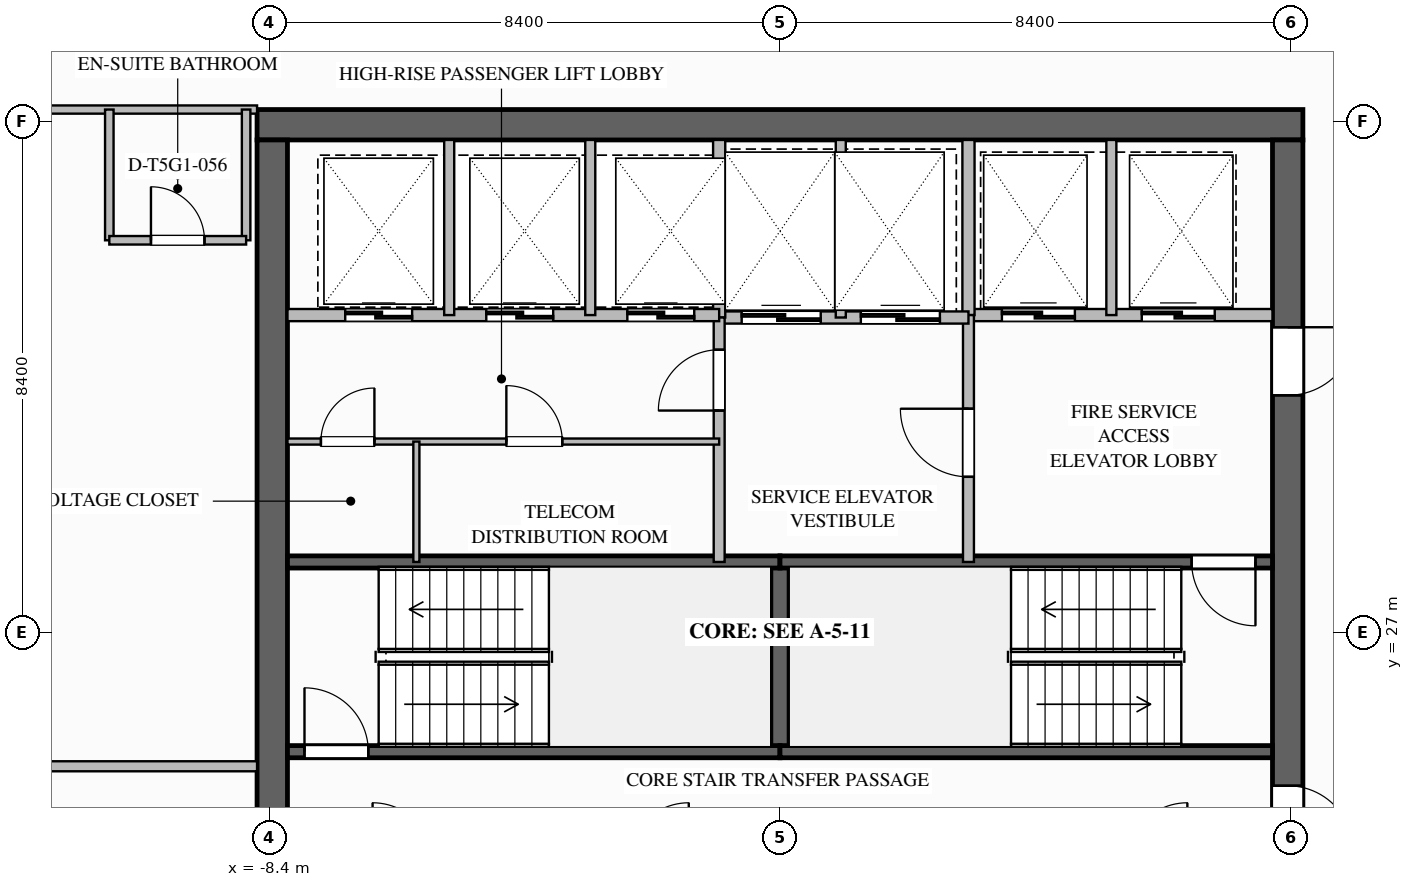
"""IFC4 building model, lengths in metres.
Left out: names, types, materials, properties, quantities, classifications, styles, units other than length and angle.
Written with IfcOpenShell. Run it as: python <this file> out.ifc"""

import sys

from ifc_helpers import new_model, si_unit, direction, frame, frame_2d, origin, place, context, subcontext, project, spatial, rectangle, extrude, element, fill, save


model = new_model("IFC4")
c1 = context("Model", 3, precision=1e-05, world=origin(), true_north=direction((0.0, 1.0)))
c2 = subcontext(c1, "Body", "Model", "MODEL_VIEW")
j1 = project(units=[si_unit("LENGTHUNIT", "METRE"), si_unit("PLANEANGLEUNIT", "RADIAN")], contexts=[c1])
p1 = place(None, origin())
s1 = spatial("IfcSite", under=j1, at=p1, CompositionType="ELEMENT")
p2 = place(p1, origin())
s2 = spatial("IfcBuilding", under=s1, at=p2, CompositionType="ELEMENT")
p3 = place(p2, frame((0.0, 0.0, 272.3)))
s3 = spatial("IfcBuildingStorey", under=s2, at=p3, CompositionType="ELEMENT", Elevation=272.3)
p4 = place(p3, frame((-8.6, 35.35, 0.0), z_axis=(0.0, 0.0, 1.0), x_axis=(1.0, 0.0, 0.0)))
e1 = element("IfcWall", 1, at=p4, inside=s3, PredefinedType="SHEAR", context=c2, shape_type="SweptSolid", body=[
    extrude(rectangle(XDim=17.2, YDim=0.5, at=frame_2d((8.6, 0.0))), origin(), (0.0, 0.0, 1.0), 3.65),
])
p5 = place(p3, frame((8.35, 35.1, 0.0), z_axis=(0.0, 0.0, 1.0), x_axis=(0.0, -1.0, 0.0)))
e2 = element("IfcWall", 2, at=p5, inside=s3, PredefinedType="SHEAR", context=c2, shape_type="SweptSolid", body=[
    extrude(rectangle(XDim=16.2, YDim=0.5, at=frame_2d((8.1, 0.0))), origin(), (0.0, 0.0, 1.0), 3.65),
])
p6 = place(p5, frame((3.08, 0.0, 0.0)))
e3 = element("IfcOpeningElement", 3, at=p6, cuts=e2, PredefinedType="OPENING", context=c2, shape_type="SweptSolid", body=[
    extrude(rectangle(XDim=1.12, YDim=2.1, at=frame_2d((0.56, 1.05))), frame((0.0, 0.26, 0.0), z_axis=(0.0, -1.0, 0.0), x_axis=(1.0, 0.0, 0.0)), (0.0, 0.0, 1.0), 0.52),
])
p7 = place(p5, frame((10.62, 0.0, 0.0)))
e4 = element("IfcOpeningElement", 4, at=p7, cuts=e2, PredefinedType="OPENING", context=c2, shape_type="SweptSolid", body=[
    extrude(rectangle(XDim=1.08, YDim=2.04, at=frame_2d((0.54, 1.02))), frame((0.0, 0.26, 0.0), z_axis=(0.0, -1.0, 0.0), x_axis=(1.0, 0.0, 0.0)), (0.0, 0.0, 1.0), 0.52),
])
p8 = place(p3, frame((-8.35, 18.9, 0.0), z_axis=(0.0, 0.0, 1.0), x_axis=(0.0, 1.0, 0.0)))
e5 = element("IfcWall", 5, at=p8, inside=s3, PredefinedType="SHEAR", context=c2, shape_type="SweptSolid", body=[
    extrude(rectangle(XDim=16.2, YDim=0.5, at=frame_2d((8.1, 0.0))), origin(), (0.0, 0.0, 1.0), 3.65),
])
p9 = place(p3, frame((0.0, 25.04, 0.0), z_axis=(0.0, 0.0, 1.0), x_axis=(0.0, 1.0, 0.0)))
e6 = element("IfcWall", 6, at=p9, inside=s3, PredefinedType="SOLIDWALL", context=c2, shape_type="SweptSolid", body=[
    extrude(rectangle(XDim=3.12, YDim=0.3, at=frame_2d((1.56, 0.0))), origin(), (0.0, 0.0, 1.0), 3.39),
])
p10 = place(p3, frame((-8.1, 25.04, 0.0), z_axis=(0.0, 0.0, 1.0), x_axis=(1.0, 0.0, 0.0)))
e7 = element("IfcWall", 7, at=p10, inside=s3, PredefinedType="SOLIDWALL", context=c2, shape_type="SweptSolid", body=[
    extrude(rectangle(XDim=8.1, YDim=0.2, at=frame_2d((4.05, 0.0))), origin(), (0.0, 0.0, 1.0), 3.39),
])
p11 = place(p10, frame((0.28, 0.0, 0.0)))
e8 = element("IfcOpeningElement", 8, at=p11, cuts=e7, PredefinedType="OPENING", context=c2, shape_type="SweptSolid", body=[
    extrude(rectangle(XDim=1.05, YDim=2.1, at=frame_2d((0.525, 1.05))), frame((0.0, 0.11, 0.0), z_axis=(0.0, -1.0, 0.0), x_axis=(1.0, 0.0, 0.0)), (0.0, 0.0, 1.0), 0.22),
])
for number, where, z_axis, x_axis in (
    (9, (-8.1, 28.16, 0.0), (0.0, 0.0, 1.0), (1.0, 0.0, 0.0)),
    (10, (0.0, 25.04, 0.0), (0.0, 0.0, 1.0), (1.0, 0.0, 0.0)),
):
    element("IfcWall", number, at=place(p3, frame(where, z_axis=z_axis, x_axis=x_axis)), inside=s3, PredefinedType="SOLIDWALL", context=c2, shape_type="SweptSolid", body=[
        extrude(rectangle(XDim=8.1, YDim=0.2, at=frame_2d((4.05, 0.0))), origin(), (0.0, 0.0, 1.0), 3.39),
    ])
p12 = place(p3, frame((8.1, 28.16, 0.0), z_axis=(0.0, 0.0, 1.0), x_axis=(-1.0, 0.0, 0.0)))
e11 = element("IfcWall", 11, at=p12, inside=s3, PredefinedType="SOLIDWALL", context=c2, shape_type="SweptSolid", body=[
    extrude(rectangle(XDim=8.1, YDim=0.2, at=frame_2d((4.05, 0.0))), origin(), (0.0, 0.0, 1.0), 3.39),
])
p13 = place(p12, frame((0.28, 0.0, 0.0)))
e12 = element("IfcOpeningElement", 12, at=p13, cuts=e11, PredefinedType="OPENING", context=c2, shape_type="SweptSolid", body=[
    extrude(rectangle(XDim=1.05, YDim=2.1, at=frame_2d((0.525, 1.05))), frame((0.0, 0.11, 0.0), z_axis=(0.0, -1.0, 0.0), x_axis=(1.0, 0.0, 0.0)), (0.0, 0.0, 1.0), 0.22),
])
p14 = place(p3, frame((3.1, 32.22, 0.0), z_axis=(0.0, 0.0, 1.0), x_axis=(1.0, 0.0, 0.0)))
e13 = element("IfcWall", 13, at=p14, inside=s3, PredefinedType="SOLIDWALL", context=c2, shape_type="SweptSolid", body=[
    extrude(rectangle(XDim=5.0, YDim=0.2, at=frame_2d((2.5, 0.0))), origin(), (0.0, 0.0, 1.0), 3.39),
])
p15 = place(p14, frame((0.55, 0.0, 0.0)))
e14 = element("IfcOpeningElement", 14, at=p15, cuts=e13, PredefinedType="OPENING", context=c2, shape_type="SweptSolid", body=[
    extrude(rectangle(XDim=1.2, YDim=2.2, at=frame_2d((0.6, 1.1))), frame((0.0, 0.11, 0.0), z_axis=(0.0, -1.0, 0.0), x_axis=(1.0, 0.0, 0.0)), (0.0, 0.0, 1.0), 0.22),
])
p16 = place(p14, frame((2.85, 0.0, 0.0)))
e15 = element("IfcOpeningElement", 15, at=p16, cuts=e13, PredefinedType="OPENING", context=c2, shape_type="SweptSolid", body=[
    extrude(rectangle(XDim=1.2, YDim=2.2, at=frame_2d((0.6, 1.1))), frame((0.0, 0.11, 0.0), z_axis=(0.0, -1.0, 0.0), x_axis=(1.0, 0.0, 0.0)), (0.0, 0.0, 1.0), 0.22),
])
p17 = place(p3, frame((3.1, 32.22, 0.0), z_axis=(0.0, 0.0, 1.0), x_axis=(0.0, 1.0, 0.0)))
e16 = element("IfcWall", 16, at=p17, inside=s3, PredefinedType="SOLIDWALL", context=c2, shape_type="SweptSolid", body=[
    extrude(rectangle(XDim=2.88, YDim=0.2, at=frame_2d((1.44, 0.0))), origin(), (0.0, 0.0, 1.0), 3.39),
])
p18 = place(p3, frame((5.45, 32.22, 0.0), z_axis=(0.0, 0.0, 1.0), x_axis=(0.0, 1.0, 0.0)))
e17 = element("IfcWall", 17, at=p18, inside=s3, PredefinedType="PARTITIONING", context=c2, shape_type="SweptSolid", body=[
    extrude(rectangle(XDim=2.88, YDim=0.165, at=frame_2d((1.44, 0.0))), origin(), (0.0, 0.0, 1.0), 3.39),
])
p19 = place(p3, frame((3.1, 28.16, 0.0), z_axis=(0.0, 0.0, 1.0), x_axis=(0.0, 1.0, 0.0)))
e18 = element("IfcWall", 18, at=p19, inside=s3, PredefinedType="SOLIDWALL", context=c2, shape_type="SweptSolid", body=[
    extrude(rectangle(XDim=4.06, YDim=0.18, at=frame_2d((2.03, 0.0))), origin(), (0.0, 0.0, 1.0), 3.39),
])
p20 = place(p19, frame((1.4, 0.0, 0.0)))
e19 = element("IfcOpeningElement", 19, at=p20, cuts=e18, PredefinedType="OPENING", context=c2, shape_type="SweptSolid", body=[
    extrude(rectangle(XDim=1.12, YDim=2.1, at=frame_2d((0.56, 1.05))), frame((0.0, 0.1, 0.0), z_axis=(0.0, -1.0, 0.0), x_axis=(1.0, 0.0, 0.0)), (0.0, 0.0, 1.0), 0.2),
])
p21 = place(p3, frame((-1.0, 32.18, 0.0), z_axis=(0.0, 0.0, 1.0), x_axis=(1.0, 0.0, 0.0)))
e20 = element("IfcWall", 20, at=p21, inside=s3, PredefinedType="SOLIDWALL", context=c2, shape_type="SweptSolid", body=[
    extrude(rectangle(XDim=4.1, YDim=0.2, at=frame_2d((2.05, 0.0))), origin(), (0.0, 0.0, 1.0), 3.39),
])
p22 = place(p21, frame((0.37, 0.0, 0.0)))
e21 = element("IfcOpeningElement", 21, at=p22, cuts=e20, PredefinedType="OPENING", context=c2, shape_type="SweptSolid", body=[
    extrude(rectangle(XDim=1.3, YDim=2.2, at=frame_2d((0.65, 1.1))), frame((0.0, 0.11, 0.0), z_axis=(0.0, -1.0, 0.0), x_axis=(1.0, 0.0, 0.0)), (0.0, 0.0, 1.0), 0.22),
])
p23 = place(p21, frame((2.33, 0.0, 0.0)))
e22 = element("IfcOpeningElement", 22, at=p23, cuts=e20, PredefinedType="OPENING", context=c2, shape_type="SweptSolid", body=[
    extrude(rectangle(XDim=1.3, YDim=2.2, at=frame_2d((0.65, 1.1))), frame((0.0, 0.11, 0.0), z_axis=(0.0, -1.0, 0.0), x_axis=(1.0, 0.0, 0.0)), (0.0, 0.0, 1.0), 0.22),
])
p24 = place(p3, frame((-1.0, 32.18, 0.0), z_axis=(0.0, 0.0, 1.0), x_axis=(0.0, 1.0, 0.0)))
e23 = element("IfcWall", 23, at=p24, inside=s3, PredefinedType="SOLIDWALL", context=c2, shape_type="SweptSolid", body=[
    extrude(rectangle(XDim=2.92, YDim=0.2, at=frame_2d((1.46, 0.0))), origin(), (0.0, 0.0, 1.0), 3.39),
])
p25 = place(p3, frame((1.0, 32.18, 0.0), z_axis=(0.0, 0.0, 1.0), x_axis=(0.0, 1.0, 0.0)))
e24 = element("IfcWall", 24, at=p25, inside=s3, PredefinedType="PARTITIONING", context=c2, shape_type="SweptSolid", body=[
    extrude(rectangle(XDim=2.92, YDim=0.165, at=frame_2d((1.46, 0.0))), origin(), (0.0, 0.0, 1.0), 3.39),
])
p26 = place(p3, frame((-1.0, 28.16, 0.0), z_axis=(0.0, 0.0, 1.0), x_axis=(0.0, 1.0, 0.0)))
e25 = element("IfcWall", 25, at=p26, inside=s3, PredefinedType="SOLIDWALL", context=c2, shape_type="SweptSolid", body=[
    extrude(rectangle(XDim=4.02, YDim=0.18, at=frame_2d((2.01, 0.0))), origin(), (0.0, 0.0, 1.0), 3.39),
])
p27 = place(p26, frame((2.49, 0.0, 0.0)))
e26 = element("IfcOpeningElement", 26, at=p27, cuts=e25, PredefinedType="OPENING", context=c2, shape_type="SweptSolid", body=[
    extrude(rectangle(XDim=1.0, YDim=2.1, at=frame_2d((0.5, 1.05))), frame((0.0, 0.1, 0.0), z_axis=(0.0, -1.0, 0.0), x_axis=(1.0, 0.0, 0.0)), (0.0, 0.0, 1.0), 0.2),
])
p28 = place(p3, frame((-8.1, 32.22, 0.0), z_axis=(0.0, 0.0, 1.0), x_axis=(1.0, 0.0, 0.0)))
e27 = element("IfcWall", 27, at=p28, inside=s3, PredefinedType="SOLIDWALL", context=c2, shape_type="SweptSolid", body=[
    extrude(rectangle(XDim=7.1, YDim=0.2, at=frame_2d((3.55, 0.0))), origin(), (0.0, 0.0, 1.0), 3.39),
])
p29 = place(p28, frame((0.95, 0.0, 0.0)))
e28 = element("IfcOpeningElement", 28, at=p29, cuts=e27, PredefinedType="OPENING", context=c2, shape_type="SweptSolid", body=[
    extrude(rectangle(XDim=1.1, YDim=2.2, at=frame_2d((0.55, 1.1))), frame((0.0, 0.11, 0.0), z_axis=(0.0, -1.0, 0.0), x_axis=(1.0, 0.0, 0.0)), (0.0, 0.0, 1.0), 0.22),
])
p30 = place(p28, frame((3.27, 0.0, 0.0)))
e29 = element("IfcOpeningElement", 29, at=p30, cuts=e27, PredefinedType="OPENING", context=c2, shape_type="SweptSolid", body=[
    extrude(rectangle(XDim=1.1, YDim=2.2, at=frame_2d((0.55, 1.1))), frame((0.0, 0.11, 0.0), z_axis=(0.0, -1.0, 0.0), x_axis=(1.0, 0.0, 0.0)), (0.0, 0.0, 1.0), 0.22),
])
p31 = place(p28, frame((5.59, 0.0, 0.0)))
e30 = element("IfcOpeningElement", 30, at=p31, cuts=e27, PredefinedType="OPENING", context=c2, shape_type="SweptSolid", body=[
    extrude(rectangle(XDim=1.1, YDim=2.2, at=frame_2d((0.55, 1.1))), frame((0.0, 0.11, 0.0), z_axis=(0.0, -1.0, 0.0), x_axis=(1.0, 0.0, 0.0)), (0.0, 0.0, 1.0), 0.22),
])
for number, where, z_axis, x_axis in (
    (31, (-5.44, 32.22, 0.0), (0.0, 0.0, 1.0), (0.0, 1.0, 0.0)),
    (32, (-3.12, 32.22, 0.0), (0.0, 0.0, 1.0), (0.0, 1.0, 0.0)),
):
    element("IfcWall", number, at=place(p3, frame(where, z_axis=z_axis, x_axis=x_axis)), inside=s3, PredefinedType="PARTITIONING", context=c2, shape_type="SweptSolid", body=[
        extrude(rectangle(XDim=2.88, YDim=0.165, at=frame_2d((1.44, 0.0))), origin(), (0.0, 0.0, 1.0), 3.39),
    ])
p32 = place(p3, frame((-8.1, 30.14, 0.0), z_axis=(0.0, 0.0, 1.0), x_axis=(1.0, 0.0, 0.0)))
e33 = element("IfcWall", 33, at=p32, inside=s3, PredefinedType="PARTITIONING", context=c2, shape_type="SweptSolid", body=[
    extrude(rectangle(XDim=7.1, YDim=0.1, at=frame_2d((3.55, 0.0))), origin(), (0.0, 0.0, 1.0), 3.39),
])
p33 = place(p32, frame((0.55, 0.0, 0.0)))
e34 = element("IfcOpeningElement", 34, at=p33, cuts=e33, PredefinedType="OPENING", context=c2, shape_type="SweptSolid", body=[
    extrude(rectangle(XDim=0.88, YDim=2.1, at=frame_2d((0.44, 1.05))), frame((0.0, 0.06, 0.0), z_axis=(0.0, -1.0, 0.0), x_axis=(1.0, 0.0, 0.0)), (0.0, 0.0, 1.0), 0.12),
])
p34 = place(p32, frame((3.6, 0.0, 0.0)))
e35 = element("IfcOpeningElement", 35, at=p34, cuts=e33, PredefinedType="OPENING", context=c2, shape_type="SweptSolid", body=[
    extrude(rectangle(XDim=0.92, YDim=2.1, at=frame_2d((0.46, 1.05))), frame((0.0, 0.06, 0.0), z_axis=(0.0, -1.0, 0.0), x_axis=(1.0, 0.0, 0.0)), (0.0, 0.0, 1.0), 0.12),
])
p35 = place(p3, frame((-5.98, 28.16, 0.0), z_axis=(0.0, 0.0, 1.0), x_axis=(0.0, 1.0, 0.0)))
e36 = element("IfcWall", 36, at=p35, inside=s3, PredefinedType="PARTITIONING", context=c2, shape_type="SweptSolid", body=[
    extrude(rectangle(XDim=1.98, YDim=0.1, at=frame_2d((0.99, 0.0))), origin(), (0.0, 0.0, 1.0), 3.39),
])
p36 = place(p3, frame((-16.2, 35.6, 0.0), z_axis=(0.0, 0.0, 1.0), x_axis=(1.0, 0.0, 0.0)))
e37 = element("IfcWall", 37, at=p36, inside=s3, PredefinedType="PARTITIONING", context=c2, shape_type="SweptSolid", body=[
    extrude(rectangle(XDim=7.6, YDim=0.135, at=frame_2d((3.8, 0.0))), origin(), (0.0, 0.0, 1.0), 2.767),
])
p37 = place(p36, frame((2.155, 0.0, 0.0)))
e38 = element("IfcOpeningElement", 38, at=p37, cuts=e37, PredefinedType="OPENING", context=c2, shape_type="SweptSolid", body=[
    extrude(rectangle(XDim=1.26, YDim=2.2, at=frame_2d((0.63, 1.1))), frame((0.0, 0.077, 0.0), z_axis=(0.0, -1.0, 0.0), x_axis=(1.0, 0.0, 0.0)), (0.0, 0.0, 1.0), 0.155),
])
p38 = place(p3, frame((-21.4, 24.8, 0.0), z_axis=(0.0, 0.0, 1.0), x_axis=(1.0, 0.0, 0.0)))
e39 = element("IfcWall", 39, at=p38, inside=s3, PredefinedType="PARTITIONING", context=c2, shape_type="SweptSolid", body=[
    extrude(rectangle(XDim=12.8, YDim=0.165, at=frame_2d((6.4, 0.0))), origin(), (0.0, 0.0, 1.0), 3.39),
])
for number, where, z_axis, x_axis in (
    (40, (-11.03, 35.6, 0.0), (0.0, 0.0, 1.0), (0.0, -1.0, 0.0)),
    (41, (-8.78, 35.6, 0.0), (0.0, 0.0, 1.0), (0.0, -1.0, 0.0)),
):
    element("IfcWall", number, at=place(p3, frame(where, z_axis=z_axis, x_axis=x_axis)), inside=s3, PredefinedType="PLUMBINGWALL", context=c2, shape_type="SweptSolid", body=[
        extrude(rectangle(XDim=2.15, YDim=0.14, at=frame_2d((1.075, 0.0))), origin(), (0.0, 0.0, 1.0), 3.39),
    ])
p39 = place(p3, frame((-11.03, 33.45, 0.0), z_axis=(0.0, 0.0, 1.0), x_axis=(1.0, 0.0, 0.0)))
e42 = element("IfcWall", 42, at=p39, inside=s3, PredefinedType="PLUMBINGWALL", context=c2, shape_type="SweptSolid", body=[
    extrude(rectangle(XDim=2.25, YDim=0.14, at=frame_2d((1.125, 0.0))), origin(), (0.0, 0.0, 1.0), 3.39),
])
p40 = place(p39, frame((0.685, 0.0, 0.0)))
e43 = element("IfcOpeningElement", 43, at=p40, cuts=e42, PredefinedType="OPENING", context=c2, shape_type="SweptSolid", body=[
    extrude(rectangle(XDim=0.88, YDim=2.1, at=frame_2d((0.44, 1.05))), frame((0.0, 0.08, 0.0), z_axis=(0.0, -1.0, 0.0), x_axis=(1.0, 0.0, 0.0)), (0.0, 0.0, 1.0), 0.16),
])
p41 = place(p11, origin())
e44 = element("IfcDoor", 44, at=p41, inside=s3, OperationType="SINGLE_SWING_LEFT", PredefinedType="DOOR", context=c2, shape_type="SweptSolid", body=[
    extrude(rectangle(XDim=1.05, YDim=2.1, at=frame_2d((0.525, 1.05))), frame((0.0, 0.025, 0.0), z_axis=(0.0, -1.0, 0.0), x_axis=(1.0, 0.0, 0.0)), (0.0, 0.0, 1.0), 0.05),
])
fill(e8, e44)
p42 = place(p13, origin())
e45 = element("IfcDoor", 45, at=p42, inside=s3, OperationType="SINGLE_SWING_LEFT", PredefinedType="DOOR", context=c2, shape_type="SweptSolid", body=[
    extrude(rectangle(XDim=1.05, YDim=2.1, at=frame_2d((0.525, 1.05))), frame((0.0, 0.025, 0.0), z_axis=(0.0, -1.0, 0.0), x_axis=(1.0, 0.0, 0.0)), (0.0, 0.0, 1.0), 0.05),
])
fill(e12, e45)
p43 = place(p15, origin())
e46 = element("IfcDoor", 46, at=p43, inside=s3, OperationType="SLIDING_TO_LEFT", PredefinedType="DOOR", context=c2, shape_type="SweptSolid", body=[
    extrude(rectangle(XDim=1.2, YDim=2.2, at=frame_2d((0.6, 1.1))), frame((0.0, 0.025, 0.0), z_axis=(0.0, -1.0, 0.0), x_axis=(1.0, 0.0, 0.0)), (0.0, 0.0, 1.0), 0.05),
])
fill(e14, e46)
p44 = place(p16, origin())
e47 = element("IfcDoor", 47, at=p44, inside=s3, OperationType="SLIDING_TO_LEFT", PredefinedType="DOOR", context=c2, shape_type="SweptSolid", body=[
    extrude(rectangle(XDim=1.2, YDim=2.2, at=frame_2d((0.6, 1.1))), frame((0.0, 0.025, 0.0), z_axis=(0.0, -1.0, 0.0), x_axis=(1.0, 0.0, 0.0)), (0.0, 0.0, 1.0), 0.05),
])
fill(e15, e47)
p45 = place(p20, origin())
e48 = element("IfcDoor", 48, at=p45, inside=s3, OperationType="SINGLE_SWING_RIGHT", PredefinedType="DOOR", context=c2, shape_type="SweptSolid", body=[
    extrude(rectangle(XDim=1.12, YDim=2.1, at=frame_2d((0.56, 1.05))), frame((0.0, 0.025, 0.0), z_axis=(0.0, -1.0, 0.0), x_axis=(1.0, 0.0, 0.0)), (0.0, 0.0, 1.0), 0.05),
])
fill(e19, e48)
p46 = place(p6, origin())
e49 = element("IfcDoor", 49, at=p46, inside=s3, OperationType="SINGLE_SWING_LEFT", PredefinedType="DOOR", context=c2, shape_type="SweptSolid", body=[
    extrude(rectangle(XDim=1.12, YDim=2.1, at=frame_2d((0.56, 1.05))), frame((0.0, 0.025, 0.0), z_axis=(0.0, -1.0, 0.0), x_axis=(1.0, 0.0, 0.0)), (0.0, 0.0, 1.0), 0.05),
])
fill(e3, e49)
p47 = place(p22, origin())
e50 = element("IfcDoor", 50, at=p47, inside=s3, OperationType="SLIDING_TO_LEFT", PredefinedType="DOOR", context=c2, shape_type="SweptSolid", body=[
    extrude(rectangle(XDim=1.3, YDim=2.2, at=frame_2d((0.65, 1.1))), frame((0.0, 0.025, 0.0), z_axis=(0.0, -1.0, 0.0), x_axis=(1.0, 0.0, 0.0)), (0.0, 0.0, 1.0), 0.05),
])
fill(e21, e50)
p48 = place(p23, origin())
e51 = element("IfcDoor", 51, at=p48, inside=s3, OperationType="SLIDING_TO_LEFT", PredefinedType="DOOR", context=c2, shape_type="SweptSolid", body=[
    extrude(rectangle(XDim=1.3, YDim=2.2, at=frame_2d((0.65, 1.1))), frame((0.0, 0.025, 0.0), z_axis=(0.0, -1.0, 0.0), x_axis=(1.0, 0.0, 0.0)), (0.0, 0.0, 1.0), 0.05),
])
fill(e22, e51)
p49 = place(p27, origin())
e52 = element("IfcDoor", 52, at=p49, inside=s3, OperationType="SINGLE_SWING_LEFT", PredefinedType="DOOR", context=c2, shape_type="SweptSolid", body=[
    extrude(rectangle(XDim=1.0, YDim=2.1, at=frame_2d((0.5, 1.05))), frame((0.0, 0.025, 0.0), z_axis=(0.0, -1.0, 0.0), x_axis=(1.0, 0.0, 0.0)), (0.0, 0.0, 1.0), 0.05),
])
fill(e26, e52)
p50 = place(p29, origin())
e53 = element("IfcDoor", 53, at=p50, inside=s3, OperationType="SLIDING_TO_LEFT", PredefinedType="DOOR", context=c2, shape_type="SweptSolid", body=[
    extrude(rectangle(XDim=1.1, YDim=2.2, at=frame_2d((0.55, 1.1))), frame((0.0, 0.025, 0.0), z_axis=(0.0, -1.0, 0.0), x_axis=(1.0, 0.0, 0.0)), (0.0, 0.0, 1.0), 0.05),
])
fill(e28, e53)
p51 = place(p30, origin())
e54 = element("IfcDoor", 54, at=p51, inside=s3, OperationType="SLIDING_TO_LEFT", PredefinedType="DOOR", context=c2, shape_type="SweptSolid", body=[
    extrude(rectangle(XDim=1.1, YDim=2.2, at=frame_2d((0.55, 1.1))), frame((0.0, 0.025, 0.0), z_axis=(0.0, -1.0, 0.0), x_axis=(1.0, 0.0, 0.0)), (0.0, 0.0, 1.0), 0.05),
])
fill(e29, e54)
p52 = place(p31, origin())
e55 = element("IfcDoor", 55, at=p52, inside=s3, OperationType="SLIDING_TO_LEFT", PredefinedType="DOOR", context=c2, shape_type="SweptSolid", body=[
    extrude(rectangle(XDim=1.1, YDim=2.2, at=frame_2d((0.55, 1.1))), frame((0.0, 0.025, 0.0), z_axis=(0.0, -1.0, 0.0), x_axis=(1.0, 0.0, 0.0)), (0.0, 0.0, 1.0), 0.05),
])
fill(e30, e55)
p53 = place(p33, origin())
e56 = element("IfcDoor", 56, at=p53, inside=s3, OperationType="SINGLE_SWING_RIGHT", PredefinedType="DOOR", context=c2, shape_type="SweptSolid", body=[
    extrude(rectangle(XDim=0.88, YDim=2.1, at=frame_2d((0.44, 1.05))), frame((0.0, 0.025, 0.0), z_axis=(0.0, -1.0, 0.0), x_axis=(1.0, 0.0, 0.0)), (0.0, 0.0, 1.0), 0.05),
])
fill(e34, e56)
p54 = place(p34, origin())
e57 = element("IfcDoor", 57, at=p54, inside=s3, OperationType="SINGLE_SWING_LEFT", PredefinedType="DOOR", context=c2, shape_type="SweptSolid", body=[
    extrude(rectangle(XDim=0.92, YDim=2.1, at=frame_2d((0.46, 1.05))), frame((0.0, 0.025, 0.0), z_axis=(0.0, -1.0, 0.0), x_axis=(1.0, 0.0, 0.0)), (0.0, 0.0, 1.0), 0.05),
])
fill(e35, e57)
p55 = place(p7, origin())
e58 = element("IfcDoor", 58, at=p55, inside=s3, OperationType="SINGLE_SWING_RIGHT", PredefinedType="DOOR", context=c2, shape_type="SweptSolid", body=[
    extrude(rectangle(XDim=1.08, YDim=2.04, at=frame_2d((0.54, 1.02))), frame((0.0, 0.025, 0.0), z_axis=(0.0, -1.0, 0.0), x_axis=(1.0, 0.0, 0.0)), (0.0, 0.0, 1.0), 0.05),
])
fill(e4, e58)
p56 = place(p40, origin())
e59 = element("IfcDoor", 59, at=p56, inside=s3, OperationType="SINGLE_SWING_LEFT", PredefinedType="DOOR", context=c2, shape_type="SweptSolid", body=[
    extrude(rectangle(XDim=0.88, YDim=2.1, at=frame_2d((0.44, 1.05))), frame((0.0, 0.025, 0.0), z_axis=(0.0, -1.0, 0.0), x_axis=(1.0, 0.0, 0.0)), (0.0, 0.0, 1.0), 0.05),
])
fill(e43, e59)
save(model, sys.argv[1])
